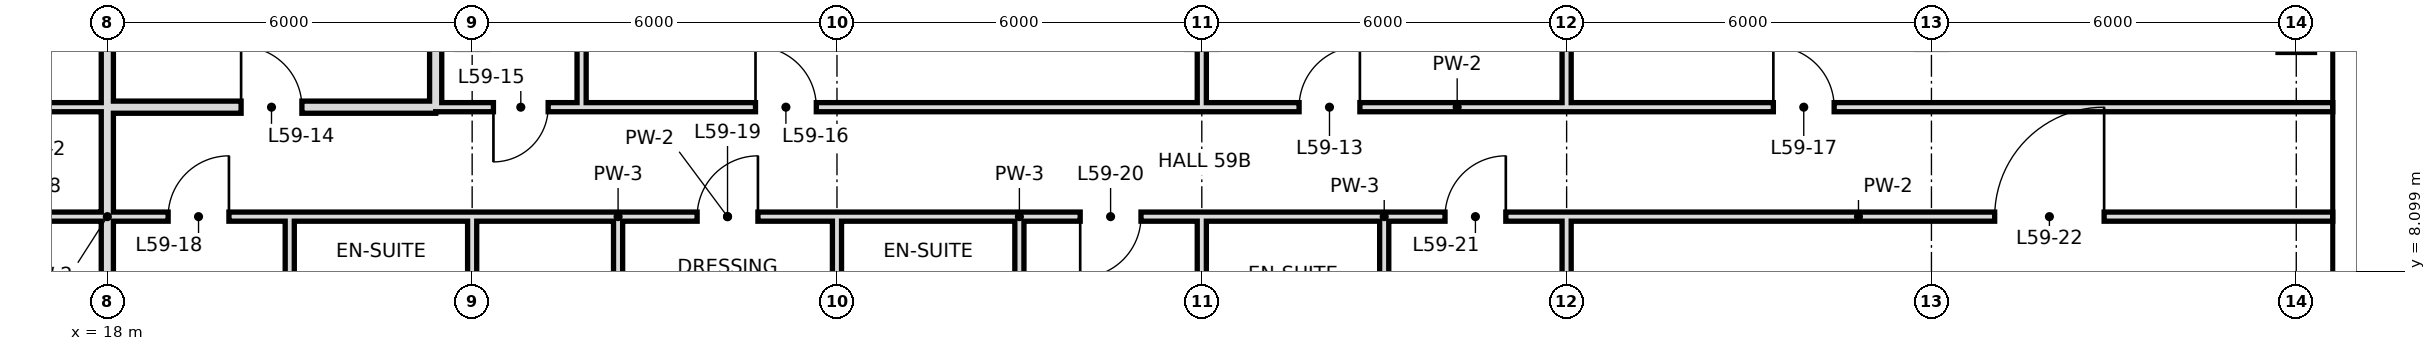
"""IFC4 building model, lengths in metres.
Left out: names, types, materials, properties, quantities, classifications, styles, units other than length and angle.
Written with IfcOpenShell. Run it as: python <this file> out.ifc"""

import sys

from ifc_helpers import new_model, si_unit, direction, frame, frame_2d, origin, place, context, subcontext, project, spatial, rectangle, extrude, element, fill, save


model = new_model("IFC4")
c1 = context("Model", 3, precision=1e-05, world=origin(), true_north=direction((0.0, 1.0)))
c2 = subcontext(c1, "Body", "Model", "MODEL_VIEW")
j1 = project(units=[si_unit("LENGTHUNIT", "METRE"), si_unit("PLANEANGLEUNIT", "RADIAN")], contexts=[c1])
p1 = place(None, origin())
s1 = spatial("IfcSite", under=j1, at=p1, CompositionType="ELEMENT")
p2 = place(p1, origin())
s2 = spatial("IfcBuilding", under=s1, at=p2, CompositionType="ELEMENT")
p3 = place(p2, frame((0.0, 0.0, 250.4)))
s3 = spatial("IfcBuildingStorey", under=s2, at=p3, CompositionType="ELEMENT", Elevation=250.4)
p4 = place(p3, frame((18.0, 10.8, 0.0), z_axis=(0.0, 0.0, 1.0), x_axis=(0.0, 1.0, 0.0)))
e1 = element("IfcWall", 1, at=p4, inside=s3, PredefinedType="SOLIDWALL", context=c2, shape_type="SweptSolid", body=[
    extrude(rectangle(XDim=7.9, YDim=0.2, at=frame_2d((3.95, 0.0))), origin(), (0.0, 0.0, 1.0), 2.72),
])
p5 = place(p3, frame((18.0, -0.6, 0.0), z_axis=(0.0, 0.0, 1.0), x_axis=(0.0, 1.0, 0.0)))
e2 = element("IfcWall", 2, at=p5, inside=s3, PredefinedType="SOLIDWALL", context=c2, shape_type="SweptSolid", body=[
    extrude(rectangle(XDim=11.4, YDim=0.2, at=frame_2d((5.7, 0.0))), origin(), (0.0, 0.0, 1.0), 2.72),
])
p6 = place(p3, frame((21.0, 6.0, 0.0), z_axis=(0.0, 0.0, 1.0), x_axis=(0.0, 1.0, 0.0)))
e3 = element("IfcWall", 3, at=p6, inside=s3, PredefinedType="PARTITIONING", context=c2, shape_type="SweptSolid", body=[
    extrude(rectangle(XDim=3.0, YDim=0.15, at=frame_2d((1.5, 0.0))), origin(), (0.0, 0.0, 1.0), 3.42),
])
p7 = place(p3, frame((23.4, 10.8, 0.0), z_axis=(0.0, 0.0, 1.0), x_axis=(0.0, 1.0, 0.0)))
e4 = element("IfcWall", 4, at=p7, inside=s3, PredefinedType="SOLIDWALL", context=c2, shape_type="SweptSolid", body=[
    extrude(rectangle(XDim=7.9, YDim=0.2, at=frame_2d((3.95, 0.0))), origin(), (0.0, 0.0, 1.0), 2.72),
])
p8 = place(p3, frame((24.0, 6.0, 0.0), z_axis=(0.0, 0.0, 1.0), x_axis=(0.0, 1.0, 0.0)))
e5 = element("IfcWall", 5, at=p8, inside=s3, PredefinedType="PARTITIONING", context=c2, shape_type="SweptSolid", body=[
    extrude(rectangle(XDim=3.0, YDim=0.15, at=frame_2d((1.5, 0.0))), origin(), (0.0, 0.0, 1.0), 2.72),
])
p9 = place(p3, frame((25.8, 10.8, 0.0), z_axis=(0.0, 0.0, 1.0), x_axis=(0.0, 1.0, 0.0)))
e6 = element("IfcWall", 6, at=p9, inside=s3, PredefinedType="PARTITIONING", context=c2, shape_type="SweptSolid", body=[
    extrude(rectangle(XDim=7.9, YDim=0.15, at=frame_2d((3.95, 0.0))), origin(), (0.0, 0.0, 1.0), 3.42),
])
p10 = place(p3, frame((26.4, 6.0, 0.0), z_axis=(0.0, 0.0, 1.0), x_axis=(0.0, 1.0, 0.0)))
e7 = element("IfcWall", 7, at=p10, inside=s3, PredefinedType="PARTITIONING", context=c2, shape_type="SweptSolid", body=[
    extrude(rectangle(XDim=3.0, YDim=0.15, at=frame_2d((1.5, 0.0))), origin(), (0.0, 0.0, 1.0), 3.42),
])
p11 = place(p3, frame((30.0, 6.0, 0.0), z_axis=(0.0, 0.0, 1.0), x_axis=(0.0, 1.0, 0.0)))
e8 = element("IfcWall", 8, at=p11, inside=s3, PredefinedType="PARTITIONING", context=c2, shape_type="SweptSolid", body=[
    extrude(rectangle(XDim=3.0, YDim=0.15, at=frame_2d((1.5, 0.0))), origin(), (0.0, 0.0, 1.0), 2.72),
])
p12 = place(p3, frame((33.0, 6.0, 0.0), z_axis=(0.0, 0.0, 1.0), x_axis=(0.0, 1.0, 0.0)))
e9 = element("IfcWall", 9, at=p12, inside=s3, PredefinedType="PARTITIONING", context=c2, shape_type="SweptSolid", body=[
    extrude(rectangle(XDim=3.0, YDim=0.15, at=frame_2d((1.5, 0.0))), origin(), (0.0, 0.0, 1.0), 3.42),
])
p13 = place(p3, frame((36.0, 10.8, 0.0), z_axis=(0.0, 0.0, 1.0), x_axis=(0.0, 1.0, 0.0)))
e10 = element("IfcWall", 10, at=p13, inside=s3, PredefinedType="PARTITIONING", context=c2, shape_type="SweptSolid", body=[
    extrude(rectangle(XDim=7.9, YDim=0.15, at=frame_2d((3.95, 0.0))), origin(), (0.0, 0.0, 1.0), 2.72),
])
p14 = place(p3, frame((36.0, 6.0, 0.0), z_axis=(0.0, 0.0, 1.0), x_axis=(0.0, 1.0, 0.0)))
e11 = element("IfcWall", 11, at=p14, inside=s3, PredefinedType="PARTITIONING", context=c2, shape_type="SweptSolid", body=[
    extrude(rectangle(XDim=3.0, YDim=0.15, at=frame_2d((1.5, 0.0))), origin(), (0.0, 0.0, 1.0), 2.72),
])
p15 = place(p3, frame((39.0, 6.0, 0.0), z_axis=(0.0, 0.0, 1.0), x_axis=(0.0, 1.0, 0.0)))
e12 = element("IfcWall", 12, at=p15, inside=s3, PredefinedType="PARTITIONING", context=c2, shape_type="SweptSolid", body=[
    extrude(rectangle(XDim=3.0, YDim=0.15, at=frame_2d((1.5, 0.0))), origin(), (0.0, 0.0, 1.0), 3.42),
])
p16 = place(p3, frame((42.0, -0.6, 0.0), z_axis=(0.0, 0.0, 1.0), x_axis=(0.0, 1.0, 0.0)))
e13 = element("IfcWall", 13, at=p16, inside=s3, PredefinedType="PARTITIONING", context=c2, shape_type="SweptSolid", body=[
    extrude(rectangle(XDim=9.6, YDim=0.15, at=frame_2d((4.8, 0.0))), origin(), (0.0, 0.0, 1.0), 2.72),
])
p17 = place(p3, frame((42.0, 10.8, 0.0), z_axis=(0.0, 0.0, 1.0), x_axis=(0.0, 1.0, 0.0)))
e14 = element("IfcWall", 14, at=p17, inside=s3, PredefinedType="PARTITIONING", context=c2, shape_type="SweptSolid", body=[
    extrude(rectangle(XDim=7.9, YDim=0.15, at=frame_2d((3.95, 0.0))), origin(), (0.0, 0.0, 1.0), 2.72),
])
p18 = place(p3, frame((18.0, 10.8, 0.0), z_axis=(0.0, 0.0, 1.0), x_axis=(1.0, 0.0, 0.0)))
e15 = element("IfcWall", 15, at=p18, inside=s3, PredefinedType="SOLIDWALL", context=c2, shape_type="SweptSolid", body=[
    extrude(rectangle(XDim=5.4, YDim=0.2, at=frame_2d((2.7, 0.0))), origin(), (0.0, 0.0, 1.0), 2.72),
])
p19 = place(p18, frame((2.2, 0.0, 0.0)))
e16 = element("IfcOpeningElement", 16, at=p19, cuts=e15, PredefinedType="OPENING", context=c2, shape_type="SweptSolid", body=[
    extrude(rectangle(XDim=1.0, YDim=2.4, at=frame_2d((0.5, 1.2))), frame((0.0, 0.11, 0.0), z_axis=(0.0, -1.0, 0.0), x_axis=(1.0, 0.0, 0.0)), (0.0, 0.0, 1.0), 0.22),
])
p20 = place(p3, frame((14.4, 10.8, 0.0), z_axis=(0.0, 0.0, 1.0), x_axis=(1.0, 0.0, 0.0)))
e17 = element("IfcWall", 17, at=p20, inside=s3, PredefinedType="PARTITIONING", context=c2, shape_type="SweptSolid", body=[
    extrude(rectangle(XDim=3.6, YDim=0.15, at=frame_2d((1.8, 0.0))), origin(), (0.0, 0.0, 1.0), 3.42),
])
p21 = place(p20, frame((0.88, 0.0, 0.0)))
e18 = element("IfcOpeningElement", 18, at=p21, cuts=e17, PredefinedType="OPENING", context=c2, shape_type="SweptSolid", body=[
    extrude(rectangle(XDim=1.0, YDim=2.4, at=frame_2d((0.5, 1.2))), frame((0.0, 0.085, 0.0), z_axis=(0.0, -1.0, 0.0), x_axis=(1.0, 0.0, 0.0)), (0.0, 0.0, 1.0), 0.17),
])
p22 = place(p3, frame((25.8, 10.8, 0.0), z_axis=(0.0, 0.0, 1.0), x_axis=(1.0, 0.0, 0.0)))
e19 = element("IfcWall", 19, at=p22, inside=s3, PredefinedType="PARTITIONING", context=c2, shape_type="SweptSolid", body=[
    extrude(rectangle(XDim=28.8, YDim=0.15, at=frame_2d((14.4, 0.0))), origin(), (0.0, 0.0, 1.0), 3.42),
])
p23 = place(p22, frame((11.8, 0.0, 0.0)))
e20 = element("IfcOpeningElement", 20, at=p23, cuts=e19, PredefinedType="OPENING", context=c2, shape_type="SweptSolid", body=[
    extrude(rectangle(XDim=1.0, YDim=2.4, at=frame_2d((0.5, 1.2))), frame((0.0, 0.085, 0.0), z_axis=(0.0, -1.0, 0.0), x_axis=(1.0, 0.0, 0.0)), (0.0, 0.0, 1.0), 0.17),
])
p24 = place(p22, frame((2.86, 0.0, 0.0)))
e21 = element("IfcOpeningElement", 21, at=p24, cuts=e19, PredefinedType="OPENING", context=c2, shape_type="SweptSolid", body=[
    extrude(rectangle(XDim=1.0, YDim=2.4, at=frame_2d((0.5, 1.2))), frame((0.0, 0.085, 0.0), z_axis=(0.0, -1.0, 0.0), x_axis=(1.0, 0.0, 0.0)), (0.0, 0.0, 1.0), 0.17),
])
p25 = place(p22, frame((19.6, 0.0, 0.0)))
e22 = element("IfcOpeningElement", 22, at=p25, cuts=e19, PredefinedType="OPENING", context=c2, shape_type="SweptSolid", body=[
    extrude(rectangle(XDim=1.0, YDim=2.4, at=frame_2d((0.5, 1.2))), frame((0.0, 0.085, 0.0), z_axis=(0.0, -1.0, 0.0), x_axis=(1.0, 0.0, 0.0)), (0.0, 0.0, 1.0), 0.17),
])
p26 = place(p3, frame((23.4, 10.8, 0.0), z_axis=(0.0, 0.0, 1.0), x_axis=(1.0, 0.0, 0.0)))
e23 = element("IfcWall", 23, at=p26, inside=s3, PredefinedType="PARTITIONING", context=c2, shape_type="SweptSolid", body=[
    extrude(rectangle(XDim=2.4, YDim=0.15, at=frame_2d((1.2, 0.0))), origin(), (0.0, 0.0, 1.0), 3.42),
])
p27 = place(p26, frame((0.95, 0.0, 0.0)))
e24 = element("IfcOpeningElement", 24, at=p27, cuts=e23, PredefinedType="OPENING", context=c2, shape_type="SweptSolid", body=[
    extrude(rectangle(XDim=0.9, YDim=2.4, at=frame_2d((0.45, 1.2))), frame((0.0, 0.085, 0.0), z_axis=(0.0, -1.0, 0.0), x_axis=(1.0, 0.0, 0.0)), (0.0, 0.0, 1.0), 0.17),
])
p28 = place(p3, frame((15.0, 9.0, 0.0), z_axis=(0.0, 0.0, 1.0), x_axis=(1.0, 0.0, 0.0)))
e25 = element("IfcWall", 25, at=p28, inside=s3, PredefinedType="PARTITIONING", context=c2, shape_type="SweptSolid", body=[
    extrude(rectangle(XDim=6.0, YDim=0.15, at=frame_2d((3.0, 0.0))), origin(), (0.0, 0.0, 1.0), 3.42),
])
p29 = place(p28, frame((0.7, 0.0, 0.0)))
e26 = element("IfcOpeningElement", 26, at=p29, cuts=e25, PredefinedType="OPENING", context=c2, shape_type="SweptSolid", body=[
    extrude(rectangle(XDim=1.0, YDim=2.4, at=frame_2d((0.5, 1.2))), frame((0.0, 0.085, 0.0), z_axis=(0.0, -1.0, 0.0), x_axis=(1.0, 0.0, 0.0)), (0.0, 0.0, 1.0), 0.17),
])
p30 = place(p28, frame((4.0, 0.0, 0.0)))
e27 = element("IfcOpeningElement", 27, at=p30, cuts=e25, PredefinedType="OPENING", context=c2, shape_type="SweptSolid", body=[
    extrude(rectangle(XDim=1.0, YDim=2.4, at=frame_2d((0.5, 1.2))), frame((0.0, 0.085, 0.0), z_axis=(0.0, -1.0, 0.0), x_axis=(1.0, 0.0, 0.0)), (0.0, 0.0, 1.0), 0.17),
])
p31 = place(p3, frame((26.4, 9.0, 0.0), z_axis=(0.0, 0.0, 1.0), x_axis=(1.0, 0.0, 0.0)))
e28 = element("IfcWall", 28, at=p31, inside=s3, PredefinedType="PARTITIONING", context=c2, shape_type="SweptSolid", body=[
    extrude(rectangle(XDim=3.6, YDim=0.15, at=frame_2d((1.8, 0.0))), origin(), (0.0, 0.0, 1.0), 3.42),
])
p32 = place(p31, frame((1.3, 0.0, 0.0)))
e29 = element("IfcOpeningElement", 29, at=p32, cuts=e28, PredefinedType="OPENING", context=c2, shape_type="SweptSolid", body=[
    extrude(rectangle(XDim=1.0, YDim=2.4, at=frame_2d((0.5, 1.2))), frame((0.0, 0.085, 0.0), z_axis=(0.0, -1.0, 0.0), x_axis=(1.0, 0.0, 0.0)), (0.0, 0.0, 1.0), 0.17),
])
p33 = place(p3, frame((33.0, 9.0, 0.0), z_axis=(0.0, 0.0, 1.0), x_axis=(1.0, 0.0, 0.0)))
e30 = element("IfcWall", 30, at=p33, inside=s3, PredefinedType="PARTITIONING", context=c2, shape_type="SweptSolid", body=[
    extrude(rectangle(XDim=3.0, YDim=0.15, at=frame_2d((1.5, 0.0))), origin(), (0.0, 0.0, 1.0), 3.42),
])
p34 = place(p33, frame((1.0, 0.0, 0.0)))
e31 = element("IfcOpeningElement", 31, at=p34, cuts=e30, PredefinedType="OPENING", context=c2, shape_type="SweptSolid", body=[
    extrude(rectangle(XDim=1.0, YDim=2.4, at=frame_2d((0.5, 1.2))), frame((0.0, 0.085, 0.0), z_axis=(0.0, -1.0, 0.0), x_axis=(1.0, 0.0, 0.0)), (0.0, 0.0, 1.0), 0.17),
])
p35 = place(p3, frame((39.0, 9.0, 0.0), z_axis=(0.0, 0.0, 1.0), x_axis=(1.0, 0.0, 0.0)))
e32 = element("IfcWall", 32, at=p35, inside=s3, PredefinedType="PARTITIONING", context=c2, shape_type="SweptSolid", body=[
    extrude(rectangle(XDim=15.6, YDim=0.15, at=frame_2d((7.8, 0.0))), origin(), (0.0, 0.0, 1.0), 3.42),
])
p36 = place(p35, frame((1.0, 0.0, 0.0)))
e33 = element("IfcOpeningElement", 33, at=p36, cuts=e32, PredefinedType="OPENING", context=c2, shape_type="SweptSolid", body=[
    extrude(rectangle(XDim=1.0, YDim=2.4, at=frame_2d((0.5, 1.2))), frame((0.0, 0.085, 0.0), z_axis=(0.0, -1.0, 0.0), x_axis=(1.0, 0.0, 0.0)), (0.0, 0.0, 1.0), 0.17),
])
p37 = place(p35, frame((10.04, 0.0, 0.0)))
e34 = element("IfcOpeningElement", 34, at=p37, cuts=e32, PredefinedType="OPENING", context=c2, shape_type="SweptSolid", body=[
    extrude(rectangle(XDim=1.8, YDim=2.4, at=frame_2d((0.9, 1.2))), frame((0.0, 0.085, 0.0), z_axis=(0.0, -1.0, 0.0), x_axis=(1.0, 0.0, 0.0)), (0.0, 0.0, 1.0), 0.17),
])
p38 = place(p3, frame((21.0, 9.0, 0.0), z_axis=(0.0, 0.0, 1.0), x_axis=(1.0, 0.0, 0.0)))
e35 = element("IfcWall", 35, at=p38, inside=s3, PredefinedType="PARTITIONING", context=c2, shape_type="SweptSolid", body=[
    extrude(rectangle(XDim=5.4, YDim=0.15, at=frame_2d((2.7, 0.0))), origin(), (0.0, 0.0, 1.0), 3.42),
])
for number, where, z_axis, x_axis in (
    (36, (30.0, 9.0, 0.0), (0.0, 0.0, 1.0), (1.0, 0.0, 0.0)),
    (37, (36.0, 9.0, 0.0), (0.0, 0.0, 1.0), (1.0, 0.0, 0.0)),
):
    element("IfcWall", number, at=place(p3, frame(where, z_axis=z_axis, x_axis=x_axis)), inside=s3, PredefinedType="PARTITIONING", context=c2, shape_type="SweptSolid", body=[
        extrude(rectangle(XDim=3.0, YDim=0.15, at=frame_2d((1.5, 0.0))), origin(), (0.0, 0.0, 1.0), 3.42),
    ])
p39 = place(p23, frame((1.0, 0.0, 0.0), z_axis=(0.0, 0.0, 1.0), x_axis=(-1.0, 0.0, 0.0)))
e38 = element("IfcDoor", 38, at=p39, inside=s3, OperationType="SINGLE_SWING_LEFT", PredefinedType="DOOR", context=c2, shape_type="SweptSolid", body=[
    extrude(rectangle(XDim=1.0, YDim=2.4, at=frame_2d((0.5, 1.2))), frame((0.0, 0.025, 0.0), z_axis=(0.0, -1.0, 0.0), x_axis=(1.0, 0.0, 0.0)), (0.0, 0.0, 1.0), 0.05),
])
fill(e20, e38)
p40 = place(p19, origin())
e39 = element("IfcDoor", 39, at=p40, inside=s3, OperationType="SINGLE_SWING_LEFT", PredefinedType="DOOR", context=c2, shape_type="SweptSolid", body=[
    extrude(rectangle(XDim=1.0, YDim=2.4, at=frame_2d((0.5, 1.2))), frame((0.0, 0.025, 0.0), z_axis=(0.0, -1.0, 0.0), x_axis=(1.0, 0.0, 0.0)), (0.0, 0.0, 1.0), 0.05),
])
fill(e16, e39)
p41 = place(p27, frame((0.9, 0.0, 0.0), z_axis=(0.0, 0.0, 1.0), x_axis=(-1.0, 0.0, 0.0)))
e40 = element("IfcDoor", 40, at=p41, inside=s3, OperationType="SINGLE_SWING_RIGHT", PredefinedType="DOOR", context=c2, shape_type="SweptSolid", body=[
    extrude(rectangle(XDim=0.9, YDim=2.4, at=frame_2d((0.45, 1.2))), frame((0.0, 0.025, 0.0), z_axis=(0.0, -1.0, 0.0), x_axis=(1.0, 0.0, 0.0)), (0.0, 0.0, 1.0), 0.05),
])
fill(e24, e40)
p42 = place(p24, origin())
e41 = element("IfcDoor", 41, at=p42, inside=s3, OperationType="SINGLE_SWING_LEFT", PredefinedType="DOOR", context=c2, shape_type="SweptSolid", body=[
    extrude(rectangle(XDim=1.0, YDim=2.4, at=frame_2d((0.5, 1.2))), frame((0.0, 0.025, 0.0), z_axis=(0.0, -1.0, 0.0), x_axis=(1.0, 0.0, 0.0)), (0.0, 0.0, 1.0), 0.05),
])
fill(e21, e41)
p43 = place(p25, origin())
e42 = element("IfcDoor", 42, at=p43, inside=s3, OperationType="SINGLE_SWING_LEFT", PredefinedType="DOOR", context=c2, shape_type="SweptSolid", body=[
    extrude(rectangle(XDim=1.0, YDim=2.4, at=frame_2d((0.5, 1.2))), frame((0.0, 0.025, 0.0), z_axis=(0.0, -1.0, 0.0), x_axis=(1.0, 0.0, 0.0)), (0.0, 0.0, 1.0), 0.05),
])
fill(e22, e42)
p44 = place(p30, frame((1.0, 0.0, 0.0), z_axis=(0.0, 0.0, 1.0), x_axis=(-1.0, 0.0, 0.0)))
e43 = element("IfcDoor", 43, at=p44, inside=s3, OperationType="SINGLE_SWING_LEFT", PredefinedType="DOOR", context=c2, shape_type="SweptSolid", body=[
    extrude(rectangle(XDim=1.0, YDim=2.4, at=frame_2d((0.5, 1.2))), frame((0.0, 0.025, 0.0), z_axis=(0.0, -1.0, 0.0), x_axis=(1.0, 0.0, 0.0)), (0.0, 0.0, 1.0), 0.05),
])
fill(e27, e43)
p45 = place(p32, frame((1.0, 0.0, 0.0), z_axis=(0.0, 0.0, 1.0), x_axis=(-1.0, 0.0, 0.0)))
e44 = element("IfcDoor", 44, at=p45, inside=s3, OperationType="SINGLE_SWING_LEFT", PredefinedType="DOOR", context=c2, shape_type="SweptSolid", body=[
    extrude(rectangle(XDim=1.0, YDim=2.4, at=frame_2d((0.5, 1.2))), frame((0.0, 0.025, 0.0), z_axis=(0.0, -1.0, 0.0), x_axis=(1.0, 0.0, 0.0)), (0.0, 0.0, 1.0), 0.05),
])
fill(e29, e44)
p46 = place(p34, frame((1.0, 0.0, 0.0), z_axis=(0.0, 0.0, 1.0), x_axis=(-1.0, 0.0, 0.0)))
e45 = element("IfcDoor", 45, at=p46, inside=s3, OperationType="SINGLE_SWING_RIGHT", PredefinedType="DOOR", context=c2, shape_type="SweptSolid", body=[
    extrude(rectangle(XDim=1.0, YDim=2.4, at=frame_2d((0.5, 1.2))), frame((0.0, 0.025, 0.0), z_axis=(0.0, -1.0, 0.0), x_axis=(1.0, 0.0, 0.0)), (0.0, 0.0, 1.0), 0.05),
])
fill(e31, e45)
p47 = place(p36, frame((1.0, 0.0, 0.0), z_axis=(0.0, 0.0, 1.0), x_axis=(-1.0, 0.0, 0.0)))
e46 = element("IfcDoor", 46, at=p47, inside=s3, OperationType="SINGLE_SWING_LEFT", PredefinedType="DOOR", context=c2, shape_type="SweptSolid", body=[
    extrude(rectangle(XDim=1.0, YDim=2.4, at=frame_2d((0.5, 1.2))), frame((0.0, 0.025, 0.0), z_axis=(0.0, -1.0, 0.0), x_axis=(1.0, 0.0, 0.0)), (0.0, 0.0, 1.0), 0.05),
])
fill(e33, e46)
p48 = place(p37, frame((1.8, 0.0, 0.0), z_axis=(0.0, 0.0, 1.0), x_axis=(-1.0, 0.0, 0.0)))
e47 = element("IfcDoor", 47, at=p48, inside=s3, OperationType="SINGLE_SWING_LEFT", PredefinedType="DOOR", context=c2, shape_type="SweptSolid", body=[
    extrude(rectangle(XDim=1.8, YDim=2.4, at=frame_2d((0.9, 1.2))), frame((0.0, 0.025, 0.0), z_axis=(0.0, -1.0, 0.0), x_axis=(1.0, 0.0, 0.0)), (0.0, 0.0, 1.0), 0.05),
])
fill(e34, e47)
save(model, sys.argv[1])
